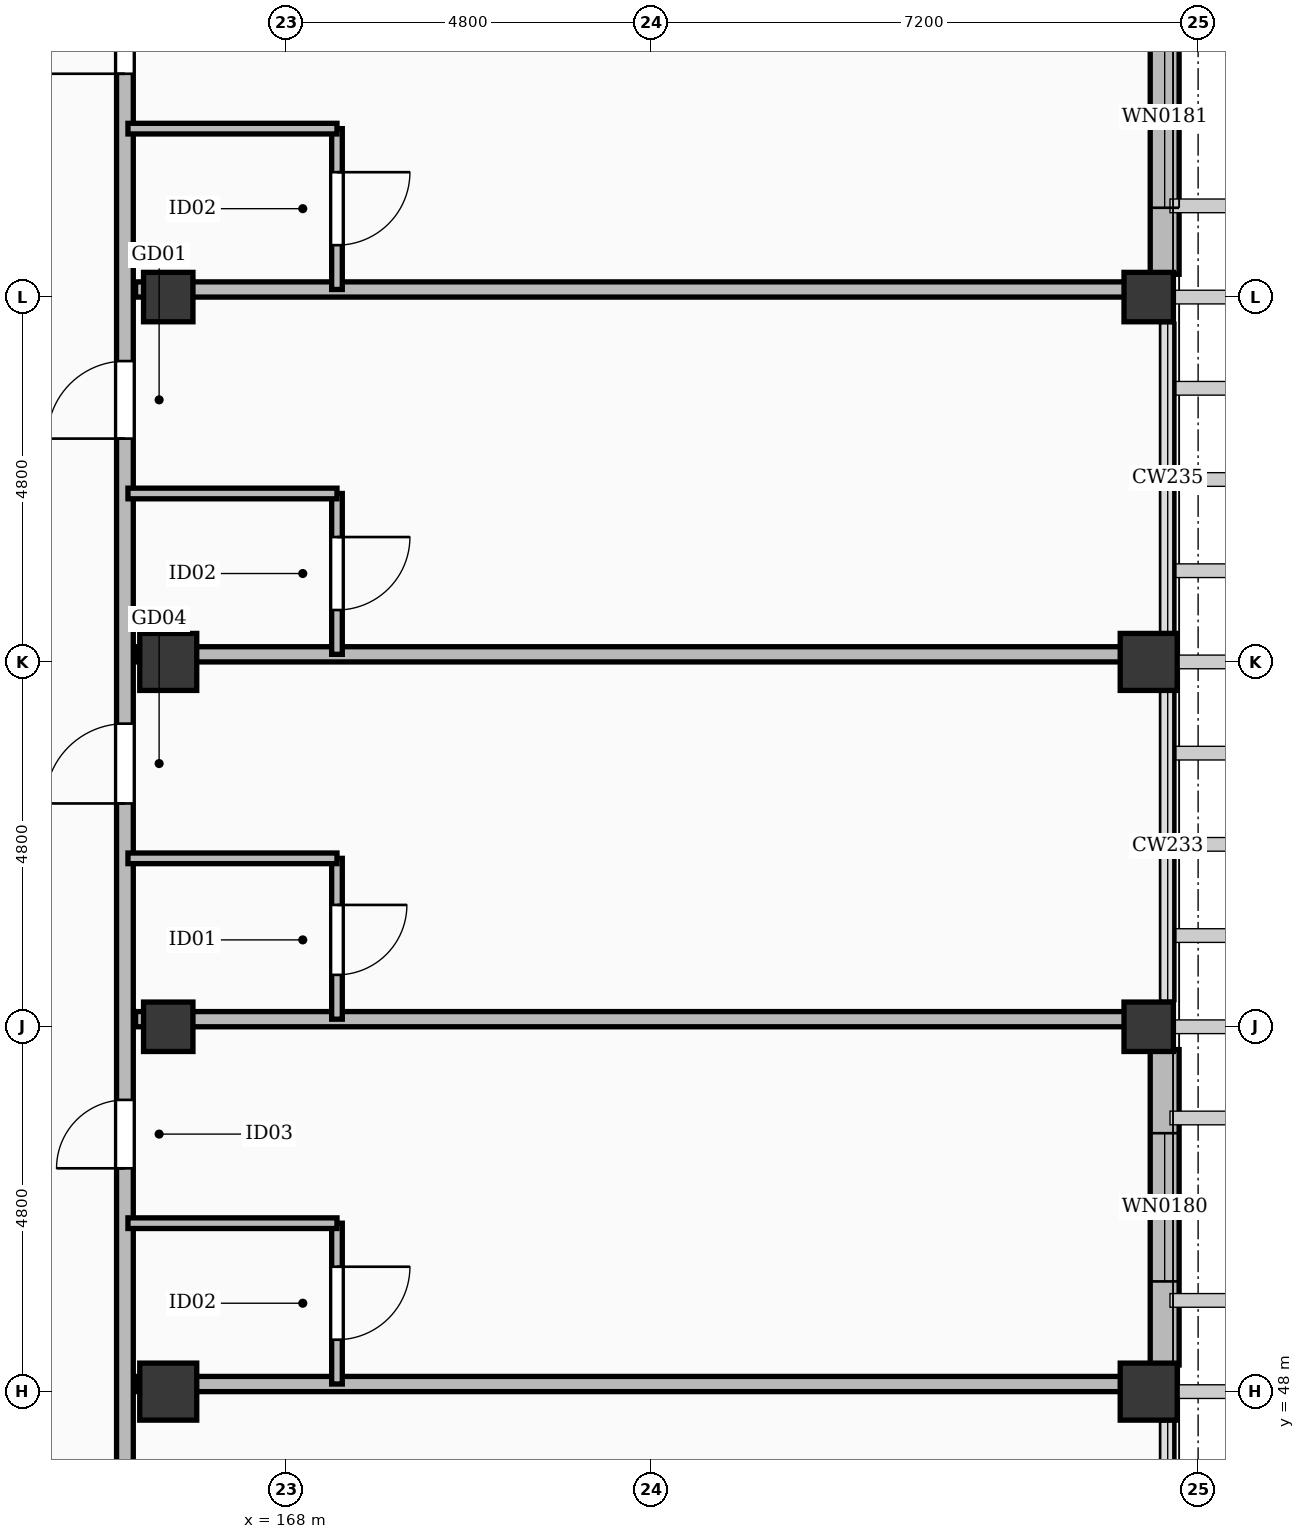
"""IFC4 building model, lengths in metres.
Left out: names, types, materials, properties, quantities, classifications, styles, units other than length and angle.
Written with IfcOpenShell. Run it as: python <this file> out.ifc"""

import sys

from ifc_helpers import new_model, si_unit, direction, frame, frame_2d, origin, origin_2d, place, context, subcontext, project, spatial, rectangle, extrude, element, fill, save


model = new_model("IFC4")
c1 = context("Model", 3, precision=1e-05, world=origin(), true_north=direction((0.0, 1.0)))
c2 = subcontext(c1, "Body", "Model", "MODEL_VIEW")
j1 = project(units=[si_unit("LENGTHUNIT", "METRE"), si_unit("PLANEANGLEUNIT", "RADIAN")], contexts=[c1])
p1 = place(None, origin())
s1 = spatial("IfcSite", under=j1, at=p1, CompositionType="ELEMENT")
p2 = place(p1, origin())
s2 = spatial("IfcBuilding", under=s1, at=p2, CompositionType="ELEMENT")
p3 = place(p2, frame((0.0, 0.0, 28.2)))
s3 = spatial("IfcBuildingStorey", under=s2, at=p3, CompositionType="ELEMENT", Elevation=28.2)
for number, where, z_axis, x_axis in (
    (1, (166.45, 48.0, 0.0), (0.0, 0.0, 1.0), (1.0, 0.0, 0.0)),
    (2, (166.45, 57.6, 0.0), (0.0, 0.0, 1.0), (1.0, 0.0, 0.0)),
    (3, (179.35, 48.0, 0.0), (0.0, 0.0, 1.0), (1.0, 0.0, 0.0)),
    (4, (179.35, 57.6, 0.0), (0.0, 0.0, 1.0), (1.0, 0.0, 0.0)),
):
    element("IfcColumn", number, at=place(p3, frame(where, z_axis=z_axis, x_axis=x_axis)), inside=s3, PredefinedType="COLUMN", context=c2, shape_type="SweptSolid", body=[
        extrude(rectangle(XDim=0.75, YDim=0.75, at=origin_2d()), origin(), (0.0, 0.0, 1.0), 3.6),
    ])
for number, where, z_axis, x_axis in (
    (5, (166.45, 52.8, 0.0), (0.0, 0.0, 1.0), (1.0, 0.0, 0.0)),
    (6, (166.45, 62.4, 0.0), (0.0, 0.0, 1.0), (1.0, 0.0, 0.0)),
    (7, (179.35, 52.8, 0.0), (0.0, 0.0, 1.0), (1.0, 0.0, 0.0)),
    (8, (179.35, 62.4, 0.0), (0.0, 0.0, 1.0), (1.0, 0.0, 0.0)),
):
    element("IfcColumn", number, at=place(p3, frame(where, z_axis=z_axis, x_axis=x_axis)), inside=s3, PredefinedType="COLUMN", context=c2, shape_type="SweptSolid", body=[
        extrude(rectangle(XDim=0.65, YDim=0.65, at=origin_2d()), origin(), (0.0, 0.0, 1.0), 3.6),
    ])
p4 = place(p3, frame((179.56, 52.5, 0.0), z_axis=(0.0, 0.0, 1.0), x_axis=(0.0, -1.0, 0.0)))
e9 = element("IfcWall", 9, at=p4, inside=s3, PredefinedType="SOLIDWALL", context=c2, shape_type="SweptSolid", body=[
    extrude(rectangle(XDim=4.15, YDim=0.38, at=frame_2d((2.075, 0.0))), origin(), (0.0, 0.0, 1.0), 2.582),
])
p5 = place(p4, frame((1.1, 0.0, 0.55)))
e10 = element("IfcOpeningElement", 10, at=p5, cuts=e9, PredefinedType="OPENING", context=c2, shape_type="SweptSolid", body=[
    extrude(rectangle(XDim=1.95, YDim=1.77, at=frame_2d((0.975, 0.885))), frame((0.0, 0.202, 0.0), z_axis=(0.0, -1.0, 0.0), x_axis=(1.0, 0.0, 0.0)), (0.0, 0.0, 1.0), 0.404),
])
p6 = place(p3, frame((179.56, 66.85, 0.0), z_axis=(0.0, 0.0, 1.0), x_axis=(0.0, -1.0, 0.0)))
e11 = element("IfcWall", 11, at=p6, inside=s3, PredefinedType="SOLIDWALL", context=c2, shape_type="SweptSolid", body=[
    extrude(rectangle(XDim=4.15, YDim=0.38, at=frame_2d((2.075, 0.0))), origin(), (0.0, 0.0, 1.0), 2.582),
])
p7 = place(p6, frame((0.875, 0.0, 0.55)))
e12 = element("IfcOpeningElement", 12, at=p7, cuts=e11, PredefinedType="OPENING", context=c2, shape_type="SweptSolid", body=[
    extrude(rectangle(XDim=2.4, YDim=1.8, at=frame_2d((1.2, 0.9))), frame((0.0, 0.202, 0.0), z_axis=(0.0, -1.0, 0.0), x_axis=(1.0, 0.0, 0.0)), (0.0, 0.0, 1.0), 0.404),
])
p8 = place(p3, frame((165.88, 38.75, 0.0), z_axis=(0.0, 0.0, 1.0), x_axis=(0.0, 1.0, 0.0)))
e13 = element("IfcWall", 13, at=p8, inside=s3, PredefinedType="PARTITIONING", context=c2, shape_type="SweptSolid", body=[
    extrude(rectangle(XDim=86.9, YDim=0.22, at=frame_2d((43.45, 0.0))), origin(), (0.0, 0.0, 1.0), 2.582),
])
p9 = place(p8, frame((0.691, 0.0, 0.0)))
e14 = element("IfcOpeningElement", 14, at=p9, cuts=e13, PredefinedType="OPENING", context=c2, shape_type="SweptSolid", body=[
    extrude(rectangle(XDim=0.98, YDim=2.15, at=frame_2d((0.49, 1.075))), frame((0.0, 0.122, 0.0), z_axis=(0.0, -1.0, 0.0), x_axis=(1.0, 0.0, 0.0)), (0.0, 0.0, 1.0), 0.244),
])
p10 = place(p8, frame((7.038, 0.0, 0.0)))
e15 = element("IfcOpeningElement", 15, at=p10, cuts=e13, PredefinedType="OPENING", context=c2, shape_type="SweptSolid", body=[
    extrude(rectangle(XDim=1.28, YDim=2.16, at=frame_2d((0.64, 1.08))), frame((0.0, 0.122, 0.0), z_axis=(0.0, -1.0, 0.0), x_axis=(1.0, 0.0, 0.0)), (0.0, 0.0, 1.0), 0.244),
])
p11 = place(p8, frame((12.188, 0.0, 0.0)))
e16 = element("IfcOpeningElement", 16, at=p11, cuts=e13, PredefinedType="OPENING", context=c2, shape_type="SweptSolid", body=[
    extrude(rectangle(XDim=0.9, YDim=2.08, at=frame_2d((0.45, 1.04))), frame((0.0, 0.122, 0.0), z_axis=(0.0, -1.0, 0.0), x_axis=(1.0, 0.0, 0.0)), (0.0, 0.0, 1.0), 0.244),
])
p12 = place(p8, frame((16.988, 0.0, 0.0)))
e17 = element("IfcOpeningElement", 17, at=p12, cuts=e13, PredefinedType="OPENING", context=c2, shape_type="SweptSolid", body=[
    extrude(rectangle(XDim=1.05, YDim=2.22, at=frame_2d((0.525, 1.11))), frame((0.0, 0.122, 0.0), z_axis=(0.0, -1.0, 0.0), x_axis=(1.0, 0.0, 0.0)), (0.0, 0.0, 1.0), 0.244),
])
p13 = place(p8, frame((21.788, 0.0, 0.0)))
e18 = element("IfcOpeningElement", 18, at=p13, cuts=e13, PredefinedType="OPENING", context=c2, shape_type="SweptSolid", body=[
    extrude(rectangle(XDim=1.02, YDim=2.2, at=frame_2d((0.51, 1.1))), frame((0.0, 0.122, 0.0), z_axis=(0.0, -1.0, 0.0), x_axis=(1.0, 0.0, 0.0)), (0.0, 0.0, 1.0), 0.244),
])
p14 = place(p8, frame((26.588, 0.0, 0.0)))
e19 = element("IfcOpeningElement", 19, at=p14, cuts=e13, PredefinedType="OPENING", context=c2, shape_type="SweptSolid", body=[
    extrude(rectangle(XDim=1.14, YDim=2.26, at=frame_2d((0.57, 1.13))), frame((0.0, 0.122, 0.0), z_axis=(0.0, -1.0, 0.0), x_axis=(1.0, 0.0, 0.0)), (0.0, 0.0, 1.0), 0.244),
])
p15 = place(p8, frame((31.388, 0.0, 0.0)))
e20 = element("IfcOpeningElement", 20, at=p15, cuts=e13, PredefinedType="OPENING", context=c2, shape_type="SweptSolid", body=[
    extrude(rectangle(XDim=0.98, YDim=2.15, at=frame_2d((0.49, 1.075))), frame((0.0, 0.122, 0.0), z_axis=(0.0, -1.0, 0.0), x_axis=(1.0, 0.0, 0.0)), (0.0, 0.0, 1.0), 0.244),
])
p16 = place(p8, frame((35.838, 0.0, 0.0)))
e21 = element("IfcOpeningElement", 21, at=p16, cuts=e13, PredefinedType="OPENING", context=c2, shape_type="SweptSolid", body=[
    extrude(rectangle(XDim=1.28, YDim=2.16, at=frame_2d((0.64, 1.08))), frame((0.0, 0.122, 0.0), z_axis=(0.0, -1.0, 0.0), x_axis=(1.0, 0.0, 0.0)), (0.0, 0.0, 1.0), 0.244),
])
p17 = place(p8, frame((40.988, 0.0, 0.0)))
e22 = element("IfcOpeningElement", 22, at=p17, cuts=e13, PredefinedType="OPENING", context=c2, shape_type="SweptSolid", body=[
    extrude(rectangle(XDim=0.9, YDim=2.08, at=frame_2d((0.45, 1.04))), frame((0.0, 0.122, 0.0), z_axis=(0.0, -1.0, 0.0), x_axis=(1.0, 0.0, 0.0)), (0.0, 0.0, 1.0), 0.244),
])
p18 = place(p8, frame((45.788, 0.0, 0.0)))
e23 = element("IfcOpeningElement", 23, at=p18, cuts=e13, PredefinedType="OPENING", context=c2, shape_type="SweptSolid", body=[
    extrude(rectangle(XDim=1.05, YDim=2.22, at=frame_2d((0.525, 1.11))), frame((0.0, 0.122, 0.0), z_axis=(0.0, -1.0, 0.0), x_axis=(1.0, 0.0, 0.0)), (0.0, 0.0, 1.0), 0.244),
])
p19 = place(p8, frame((50.588, 0.0, 0.0)))
e24 = element("IfcOpeningElement", 24, at=p19, cuts=e13, PredefinedType="OPENING", context=c2, shape_type="SweptSolid", body=[
    extrude(rectangle(XDim=1.02, YDim=2.2, at=frame_2d((0.51, 1.1))), frame((0.0, 0.122, 0.0), z_axis=(0.0, -1.0, 0.0), x_axis=(1.0, 0.0, 0.0)), (0.0, 0.0, 1.0), 0.244),
])
p20 = place(p8, frame((55.388, 0.0, 0.0)))
e25 = element("IfcOpeningElement", 25, at=p20, cuts=e13, PredefinedType="OPENING", context=c2, shape_type="SweptSolid", body=[
    extrude(rectangle(XDim=1.14, YDim=2.26, at=frame_2d((0.57, 1.13))), frame((0.0, 0.122, 0.0), z_axis=(0.0, -1.0, 0.0), x_axis=(1.0, 0.0, 0.0)), (0.0, 0.0, 1.0), 0.244),
])
p21 = place(p8, frame((60.188, 0.0, 0.0)))
e26 = element("IfcOpeningElement", 26, at=p21, cuts=e13, PredefinedType="OPENING", context=c2, shape_type="SweptSolid", body=[
    extrude(rectangle(XDim=0.98, YDim=2.15, at=frame_2d((0.49, 1.075))), frame((0.0, 0.122, 0.0), z_axis=(0.0, -1.0, 0.0), x_axis=(1.0, 0.0, 0.0)), (0.0, 0.0, 1.0), 0.244),
])
p22 = place(p8, frame((64.638, 0.0, 0.0)))
e27 = element("IfcOpeningElement", 27, at=p22, cuts=e13, PredefinedType="OPENING", context=c2, shape_type="SweptSolid", body=[
    extrude(rectangle(XDim=1.28, YDim=2.16, at=frame_2d((0.64, 1.08))), frame((0.0, 0.122, 0.0), z_axis=(0.0, -1.0, 0.0), x_axis=(1.0, 0.0, 0.0)), (0.0, 0.0, 1.0), 0.244),
])
p23 = place(p8, frame((69.788, 0.0, 0.0)))
e28 = element("IfcOpeningElement", 28, at=p23, cuts=e13, PredefinedType="OPENING", context=c2, shape_type="SweptSolid", body=[
    extrude(rectangle(XDim=0.9, YDim=2.08, at=frame_2d((0.45, 1.04))), frame((0.0, 0.122, 0.0), z_axis=(0.0, -1.0, 0.0), x_axis=(1.0, 0.0, 0.0)), (0.0, 0.0, 1.0), 0.244),
])
p24 = place(p8, frame((74.588, 0.0, 0.0)))
e29 = element("IfcOpeningElement", 29, at=p24, cuts=e13, PredefinedType="OPENING", context=c2, shape_type="SweptSolid", body=[
    extrude(rectangle(XDim=1.05, YDim=2.22, at=frame_2d((0.525, 1.11))), frame((0.0, 0.122, 0.0), z_axis=(0.0, -1.0, 0.0), x_axis=(1.0, 0.0, 0.0)), (0.0, 0.0, 1.0), 0.244),
])
p25 = place(p8, frame((79.388, 0.0, 0.0)))
e30 = element("IfcOpeningElement", 30, at=p25, cuts=e13, PredefinedType="OPENING", context=c2, shape_type="SweptSolid", body=[
    extrude(rectangle(XDim=1.02, YDim=2.2, at=frame_2d((0.51, 1.1))), frame((0.0, 0.122, 0.0), z_axis=(0.0, -1.0, 0.0), x_axis=(1.0, 0.0, 0.0)), (0.0, 0.0, 1.0), 0.244),
])
p26 = place(p8, frame((84.188, 0.0, 0.0)))
e31 = element("IfcOpeningElement", 31, at=p26, cuts=e13, PredefinedType="OPENING", context=c2, shape_type="SweptSolid", body=[
    extrude(rectangle(XDim=1.14, YDim=2.26, at=frame_2d((0.57, 1.13))), frame((0.0, 0.122, 0.0), z_axis=(0.0, -1.0, 0.0), x_axis=(1.0, 0.0, 0.0)), (0.0, 0.0, 1.0), 0.244),
])
p27 = place(p3, frame((166.02, 48.1, 0.0), z_axis=(0.0, 0.0, 1.0), x_axis=(1.0, 0.0, 0.0)))
e32 = element("IfcWall", 32, at=p27, inside=s3, PredefinedType="PARTITIONING", context=c2, shape_type="SweptSolid", body=[
    extrude(rectangle(XDim=13.23, YDim=0.2, at=frame_2d((6.615, 0.0))), origin(), (0.0, 0.0, 1.0), 2.582),
])
p28 = place(p3, frame((168.67, 48.1, 0.0), z_axis=(0.0, 0.0, 1.0), x_axis=(0.0, 1.0, 0.0)))
e33 = element("IfcWall", 33, at=p28, inside=s3, PredefinedType="PARTITIONING", context=c2, shape_type="SweptSolid", body=[
    extrude(rectangle(XDim=2.116, YDim=0.14, at=frame_2d((1.058, 0.0))), origin(), (0.0, 0.0, 1.0), 2.682),
])
p29 = place(p28, frame((0.583, 0.0, 0.0)))
e34 = element("IfcOpeningElement", 34, at=p29, cuts=e33, PredefinedType="OPENING", context=c2, shape_type="SweptSolid", body=[
    extrude(rectangle(XDim=0.96, YDim=2.12, at=frame_2d((0.48, 1.06))), frame((0.0, 0.082, 0.0), z_axis=(0.0, -1.0, 0.0), x_axis=(1.0, 0.0, 0.0)), (0.0, 0.0, 1.0), 0.164),
])
p30 = place(p3, frame((165.92, 50.216, 0.0), z_axis=(0.0, 0.0, 1.0), x_axis=(1.0, 0.0, 0.0)))
e35 = element("IfcWall", 35, at=p30, inside=s3, PredefinedType="PARTITIONING", context=c2, shape_type="SweptSolid", body=[
    extrude(rectangle(XDim=2.75, YDim=0.14, at=frame_2d((1.375, 0.0))), origin(), (0.0, 0.0, 1.0), 2.682),
])
p31 = place(p3, frame((166.02, 52.9, 0.0), z_axis=(0.0, 0.0, 1.0), x_axis=(1.0, 0.0, 0.0)))
e36 = element("IfcWall", 36, at=p31, inside=s3, PredefinedType="PARTITIONING", context=c2, shape_type="SweptSolid", body=[
    extrude(rectangle(XDim=13.23, YDim=0.2, at=frame_2d((6.615, 0.0))), origin(), (0.0, 0.0, 1.0), 2.582),
])
p32 = place(p3, frame((168.67, 52.9, 0.0), z_axis=(0.0, 0.0, 1.0), x_axis=(0.0, 1.0, 0.0)))
e37 = element("IfcWall", 37, at=p32, inside=s3, PredefinedType="PARTITIONING", context=c2, shape_type="SweptSolid", body=[
    extrude(rectangle(XDim=2.116, YDim=0.14, at=frame_2d((1.058, 0.0))), origin(), (0.0, 0.0, 1.0), 2.682),
])
p33 = place(p32, frame((0.583, 0.0, 0.0)))
e38 = element("IfcOpeningElement", 38, at=p33, cuts=e37, PredefinedType="OPENING", context=c2, shape_type="SweptSolid", body=[
    extrude(rectangle(XDim=0.92, YDim=2.1, at=frame_2d((0.46, 1.05))), frame((0.0, 0.082, 0.0), z_axis=(0.0, -1.0, 0.0), x_axis=(1.0, 0.0, 0.0)), (0.0, 0.0, 1.0), 0.164),
])
p34 = place(p3, frame((165.92, 55.016, 0.0), z_axis=(0.0, 0.0, 1.0), x_axis=(1.0, 0.0, 0.0)))
e39 = element("IfcWall", 39, at=p34, inside=s3, PredefinedType="PARTITIONING", context=c2, shape_type="SweptSolid", body=[
    extrude(rectangle(XDim=2.75, YDim=0.14, at=frame_2d((1.375, 0.0))), origin(), (0.0, 0.0, 1.0), 2.682),
])
p35 = place(p3, frame((166.02, 57.7, 0.0), z_axis=(0.0, 0.0, 1.0), x_axis=(1.0, 0.0, 0.0)))
e40 = element("IfcWall", 40, at=p35, inside=s3, PredefinedType="PARTITIONING", context=c2, shape_type="SweptSolid", body=[
    extrude(rectangle(XDim=13.23, YDim=0.2, at=frame_2d((6.615, 0.0))), origin(), (0.0, 0.0, 1.0), 2.582),
])
p36 = place(p3, frame((168.67, 57.7, 0.0), z_axis=(0.0, 0.0, 1.0), x_axis=(0.0, 1.0, 0.0)))
e41 = element("IfcWall", 41, at=p36, inside=s3, PredefinedType="PARTITIONING", context=c2, shape_type="SweptSolid", body=[
    extrude(rectangle(XDim=2.116, YDim=0.14, at=frame_2d((1.058, 0.0))), origin(), (0.0, 0.0, 1.0), 2.682),
])
p37 = place(p36, frame((0.583, 0.0, 0.0)))
e42 = element("IfcOpeningElement", 42, at=p37, cuts=e41, PredefinedType="OPENING", context=c2, shape_type="SweptSolid", body=[
    extrude(rectangle(XDim=0.96, YDim=2.12, at=frame_2d((0.48, 1.06))), frame((0.0, 0.082, 0.0), z_axis=(0.0, -1.0, 0.0), x_axis=(1.0, 0.0, 0.0)), (0.0, 0.0, 1.0), 0.164),
])
p38 = place(p3, frame((165.92, 59.816, 0.0), z_axis=(0.0, 0.0, 1.0), x_axis=(1.0, 0.0, 0.0)))
e43 = element("IfcWall", 43, at=p38, inside=s3, PredefinedType="PARTITIONING", context=c2, shape_type="SweptSolid", body=[
    extrude(rectangle(XDim=2.75, YDim=0.14, at=frame_2d((1.375, 0.0))), origin(), (0.0, 0.0, 1.0), 2.682),
])
p39 = place(p3, frame((166.02, 62.5, 0.0), z_axis=(0.0, 0.0, 1.0), x_axis=(1.0, 0.0, 0.0)))
e44 = element("IfcWall", 44, at=p39, inside=s3, PredefinedType="PARTITIONING", context=c2, shape_type="SweptSolid", body=[
    extrude(rectangle(XDim=13.23, YDim=0.2, at=frame_2d((6.615, 0.0))), origin(), (0.0, 0.0, 1.0), 2.582),
])
p40 = place(p3, frame((168.67, 62.5, 0.0), z_axis=(0.0, 0.0, 1.0), x_axis=(0.0, 1.0, 0.0)))
e45 = element("IfcWall", 45, at=p40, inside=s3, PredefinedType="PARTITIONING", context=c2, shape_type="SweptSolid", body=[
    extrude(rectangle(XDim=2.116, YDim=0.14, at=frame_2d((1.058, 0.0))), origin(), (0.0, 0.0, 1.0), 2.682),
])
p41 = place(p40, frame((0.583, 0.0, 0.0)))
e46 = element("IfcOpeningElement", 46, at=p41, cuts=e45, PredefinedType="OPENING", context=c2, shape_type="SweptSolid", body=[
    extrude(rectangle(XDim=0.96, YDim=2.12, at=frame_2d((0.48, 1.06))), frame((0.0, 0.082, 0.0), z_axis=(0.0, -1.0, 0.0), x_axis=(1.0, 0.0, 0.0)), (0.0, 0.0, 1.0), 0.164),
])
p42 = place(p3, frame((165.92, 64.616, 0.0), z_axis=(0.0, 0.0, 1.0), x_axis=(1.0, 0.0, 0.0)))
e47 = element("IfcWall", 47, at=p42, inside=s3, PredefinedType="PARTITIONING", context=c2, shape_type="SweptSolid", body=[
    extrude(rectangle(XDim=2.75, YDim=0.14, at=frame_2d((1.375, 0.0))), origin(), (0.0, 0.0, 1.0), 2.682),
])
p43 = place(p5, origin())
e48 = element("IfcWindow", 48, at=p43, inside=s3, PartitioningType="SINGLE_PANEL", PredefinedType="WINDOW", context=c2, shape_type="SweptSolid", body=[
    extrude(rectangle(XDim=1.95, YDim=1.77, at=frame_2d((0.975, 0.885))), frame((0.0, 0.03, 0.0), z_axis=(0.0, -1.0, 0.0), x_axis=(1.0, 0.0, 0.0)), (0.0, 0.0, 1.0), 0.06),
])
fill(e10, e48)
p44 = place(p7, origin())
e49 = element("IfcWindow", 49, at=p44, inside=s3, PartitioningType="SINGLE_PANEL", PredefinedType="WINDOW", context=c2, shape_type="SweptSolid", body=[
    extrude(rectangle(XDim=2.4, YDim=1.8, at=frame_2d((1.2, 0.9))), frame((0.0, 0.03, 0.0), z_axis=(0.0, -1.0, 0.0), x_axis=(1.0, 0.0, 0.0)), (0.0, 0.0, 1.0), 0.06),
])
fill(e12, e49)
p45 = place(p11, origin())
e50 = element("IfcDoor", 50, at=p45, inside=s3, OperationType="SINGLE_SWING_LEFT", PredefinedType="DOOR", context=c2, shape_type="SweptSolid", body=[
    extrude(rectangle(XDim=0.9, YDim=2.08, at=frame_2d((0.45, 1.04))), frame((0.0, 0.025, 0.0), z_axis=(0.0, -1.0, 0.0), x_axis=(1.0, 0.0, 0.0)), (0.0, 0.0, 1.0), 0.05),
])
fill(e16, e50)
p46 = place(p29, frame((0.96, 0.0, 0.0), z_axis=(0.0, 0.0, 1.0), x_axis=(-1.0, 0.0, 0.0)))
e51 = element("IfcDoor", 51, at=p46, inside=s3, OperationType="SINGLE_SWING_RIGHT", PredefinedType="DOOR", context=c2, shape_type="SweptSolid", body=[
    extrude(rectangle(XDim=0.96, YDim=2.12, at=frame_2d((0.48, 1.06))), frame((0.0, 0.025, 0.0), z_axis=(0.0, -1.0, 0.0), x_axis=(1.0, 0.0, 0.0)), (0.0, 0.0, 1.0), 0.05),
])
fill(e34, e51)
p47 = place(p12, origin())
e52 = element("IfcDoor", 52, at=p47, inside=s3, OperationType="SINGLE_SWING_LEFT", PredefinedType="DOOR", context=c2, shape_type="SweptSolid", body=[
    extrude(rectangle(XDim=1.05, YDim=2.22, at=frame_2d((0.525, 1.11))), frame((0.0, 0.025, 0.0), z_axis=(0.0, -1.0, 0.0), x_axis=(1.0, 0.0, 0.0)), (0.0, 0.0, 1.0), 0.05),
])
fill(e17, e52)
p48 = place(p33, frame((0.92, 0.0, 0.0), z_axis=(0.0, 0.0, 1.0), x_axis=(-1.0, 0.0, 0.0)))
e53 = element("IfcDoor", 53, at=p48, inside=s3, OperationType="SINGLE_SWING_RIGHT", PredefinedType="DOOR", context=c2, shape_type="SweptSolid", body=[
    extrude(rectangle(XDim=0.92, YDim=2.1, at=frame_2d((0.46, 1.05))), frame((0.0, 0.025, 0.0), z_axis=(0.0, -1.0, 0.0), x_axis=(1.0, 0.0, 0.0)), (0.0, 0.0, 1.0), 0.05),
])
fill(e38, e53)
p49 = place(p13, origin())
e54 = element("IfcDoor", 54, at=p49, inside=s3, OperationType="SINGLE_SWING_LEFT", PredefinedType="DOOR", context=c2, shape_type="SweptSolid", body=[
    extrude(rectangle(XDim=1.02, YDim=2.2, at=frame_2d((0.51, 1.1))), frame((0.0, 0.025, 0.0), z_axis=(0.0, -1.0, 0.0), x_axis=(1.0, 0.0, 0.0)), (0.0, 0.0, 1.0), 0.05),
])
fill(e18, e54)
p50 = place(p37, frame((0.96, 0.0, 0.0), z_axis=(0.0, 0.0, 1.0), x_axis=(-1.0, 0.0, 0.0)))
e55 = element("IfcDoor", 55, at=p50, inside=s3, OperationType="SINGLE_SWING_RIGHT", PredefinedType="DOOR", context=c2, shape_type="SweptSolid", body=[
    extrude(rectangle(XDim=0.96, YDim=2.12, at=frame_2d((0.48, 1.06))), frame((0.0, 0.025, 0.0), z_axis=(0.0, -1.0, 0.0), x_axis=(1.0, 0.0, 0.0)), (0.0, 0.0, 1.0), 0.05),
])
fill(e42, e55)
p51 = place(p14, origin())
e56 = element("IfcDoor", 56, at=p51, inside=s3, OperationType="SINGLE_SWING_LEFT", PredefinedType="DOOR", context=c2, shape_type="SweptSolid", body=[
    extrude(rectangle(XDim=1.14, YDim=2.26, at=frame_2d((0.57, 1.13))), frame((0.0, 0.025, 0.0), z_axis=(0.0, -1.0, 0.0), x_axis=(1.0, 0.0, 0.0)), (0.0, 0.0, 1.0), 0.05),
])
fill(e19, e56)
p52 = place(p41, frame((0.96, 0.0, 0.0), z_axis=(0.0, 0.0, 1.0), x_axis=(-1.0, 0.0, 0.0)))
e57 = element("IfcDoor", 57, at=p52, inside=s3, OperationType="SINGLE_SWING_RIGHT", PredefinedType="DOOR", context=c2, shape_type="SweptSolid", body=[
    extrude(rectangle(XDim=0.96, YDim=2.12, at=frame_2d((0.48, 1.06))), frame((0.0, 0.025, 0.0), z_axis=(0.0, -1.0, 0.0), x_axis=(1.0, 0.0, 0.0)), (0.0, 0.0, 1.0), 0.05),
])
fill(e46, e57)
save(model, sys.argv[1])
